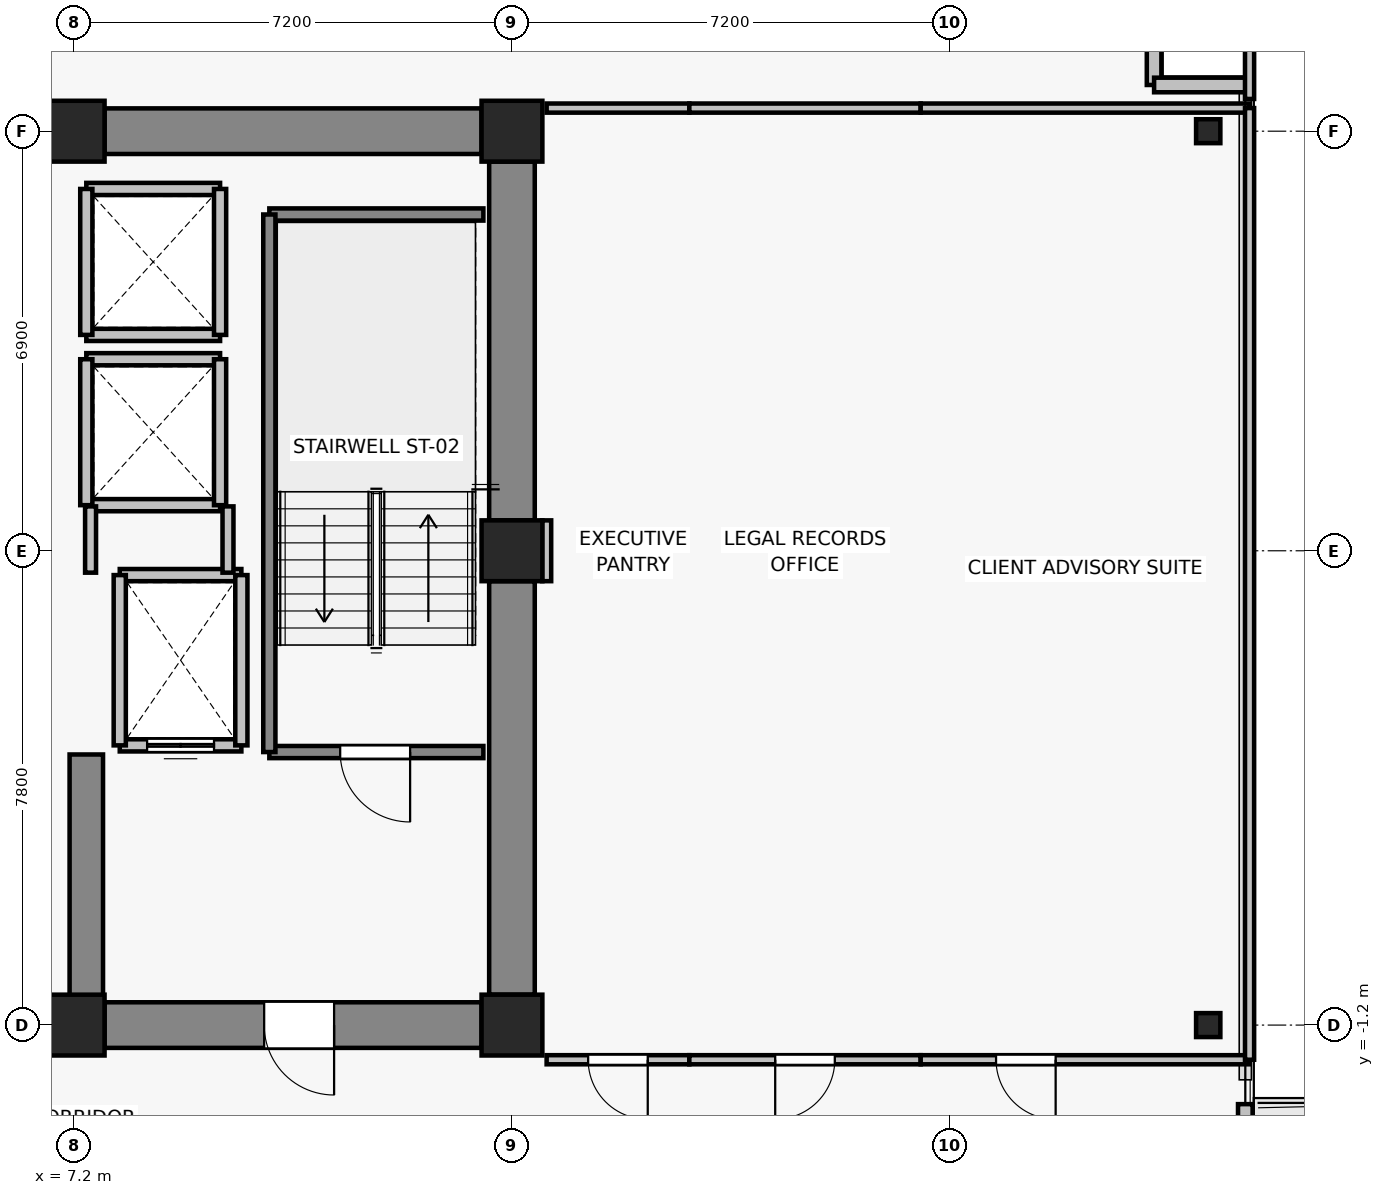
"""IFC4 building model, lengths in metres.
Left out: names, types, materials, properties, quantities, classifications, styles, units other than length and angle.
Written with IfcOpenShell. Run it as: python <this file> out.ifc"""

import sys

from ifc_helpers import new_model, si_unit, direction, frame, frame_2d, origin, origin_2d, place, context, subcontext, project, spatial, rectangle, i_section, extrude, source, transform, mapped, element, fill, save


model = new_model("IFC4")
c1 = context("Model", 3, precision=1e-05, world=origin(), true_north=direction((0.0, 1.0)))
c2 = subcontext(c1, "Body", "Model", "MODEL_VIEW")
j1 = project(units=[si_unit("LENGTHUNIT", "METRE"), si_unit("PLANEANGLEUNIT", "RADIAN")], contexts=[c1])
p1 = place(None, origin())
s1 = spatial("IfcSite", under=j1, at=p1, CompositionType="ELEMENT")
p2 = place(p1, origin())
s2 = spatial("IfcBuilding", under=s1, at=p2, CompositionType="ELEMENT")
p3 = place(p2, frame((0.0, 0.0, 195.7)))
s3 = spatial("IfcBuildingStorey", under=s2, at=p3, CompositionType="ELEMENT", Elevation=195.7)
for number, where, z_axis, x_axis in (
    (1, (7.2, -1.2, 0.0), (0.0, 0.0, 1.0), (1.0, 0.0, 0.0)),
    (2, (14.4, -1.2, 0.0), (0.0, 0.0, 1.0), (1.0, 0.0, 0.0)),
    (3, (14.4, 6.6, 0.0), (0.0, 0.0, 1.0), (1.0, 0.0, 0.0)),
    (4, (7.2, 13.5, 0.0), (0.0, 0.0, 1.0), (1.0, 0.0, 0.0)),
    (5, (14.4, 13.5, 0.0), (0.0, 0.0, 1.0), (1.0, 0.0, 0.0)),
):
    element("IfcColumn", number, at=place(p3, frame(where, z_axis=z_axis, x_axis=x_axis)), inside=s3, PredefinedType="COLUMN", context=c2, shape_type="SweptSolid", body=[
        extrude(rectangle(XDim=1.0, YDim=1.0, at=origin_2d()), origin(), (0.0, 0.0, 1.0), 3.3),
    ])
for number, where, z_axis, x_axis in (
    (6, (25.85, -1.2, 0.0), (0.0, 0.0, 1.0), (1.0, 0.0, 0.0)),
    (7, (25.85, 13.5, 0.0), (0.0, 0.0, 1.0), (1.0, 0.0, 0.0)),
):
    element("IfcColumn", number, at=place(p3, frame(where, z_axis=z_axis, x_axis=x_axis)), inside=s3, PredefinedType="COLUMN", context=c2, shape_type="SweptSolid", body=[
        extrude(i_section(OverallWidth=0.399, OverallDepth=0.394, WebThickness=0.023, FlangeThickness=0.037, FilletRadius=0.015, at=origin_2d()), origin(), (0.0, 0.0, 1.0), 3.3),
    ])
p4 = place(p3, frame((7.7, 13.5, 0.0), z_axis=(0.0, 0.0, 1.0), x_axis=(1.0, 0.0, 0.0)))
e8 = element("IfcWall", 8, at=p4, inside=s3, PredefinedType="SHEAR", context=c2, shape_type="SweptSolid", body=[
    extrude(rectangle(XDim=6.2, YDim=0.75, at=frame_2d((3.1, 0.0))), origin(), (0.0, 0.0, 1.0), 3.05),
])
p5 = place(p3, frame((14.4, -0.7, 0.0), z_axis=(0.0, 0.0, 1.0), x_axis=(0.0, 1.0, 0.0)))
e9 = element("IfcWall", 9, at=p5, inside=s3, PredefinedType="SHEAR", context=c2, shape_type="SweptSolid", body=[
    extrude(rectangle(XDim=6.8, YDim=0.75, at=frame_2d((3.4, 0.0))), origin(), (0.0, 0.0, 1.0), 3.05),
])
p6 = place(p3, frame((14.4, 7.1, 0.0), z_axis=(0.0, 0.0, 1.0), x_axis=(0.0, 1.0, 0.0)))
e10 = element("IfcWall", 10, at=p6, inside=s3, PredefinedType="SHEAR", context=c2, shape_type="SweptSolid", body=[
    extrude(rectangle(XDim=5.9, YDim=0.75, at=frame_2d((2.95, 0.0))), origin(), (0.0, 0.0, 1.0), 3.05),
])
p7 = place(p3, frame((13.9, -1.2, 0.0), z_axis=(0.0, 0.0, 1.0), x_axis=(-1.0, 0.0, 0.0)))
e11 = element("IfcWall", 11, at=p7, inside=s3, PredefinedType="SHEAR", context=c2, shape_type="SweptSolid", body=[
    extrude(rectangle(XDim=6.2, YDim=0.75, at=frame_2d((3.1, 0.0))), origin(), (0.0, 0.0, 1.0), 3.05),
])
p8 = place(p7, frame((2.425, 0.0, 0.0)))
e12 = element("IfcOpeningElement", 12, at=p8, cuts=e11, PredefinedType="OPENING", context=c2, shape_type="SweptSolid", body=[
    extrude(rectangle(XDim=1.15, YDim=2.15, at=frame_2d((0.575, 1.075))), frame((0.0, 0.385, 0.0), z_axis=(0.0, -1.0, 0.0), x_axis=(1.0, 0.0, 0.0)), (0.0, 0.0, 1.0), 0.77),
])
p9 = place(p3, frame((7.4, -0.825, 0.0), z_axis=(0.0, 0.0, 1.0), x_axis=(0.0, 1.0, 0.0)))
e13 = element("IfcWall", 13, at=p9, inside=s3, PredefinedType="SHEAR", context=c2, shape_type="SweptSolid", body=[
    extrude(rectangle(XDim=4.075, YDim=0.55, at=frame_2d((2.038, 0.0))), origin(), (0.0, 0.0, 1.0), 3.05),
])
p10 = place(p3, frame((26.46, -2.5, 0.0), z_axis=(0.0, 0.0, 1.0), x_axis=(0.0, -1.0, 0.0)))
e14 = element("IfcWall", 14, at=p10, inside=s3, PredefinedType="SOLIDWALL", context=c2, shape_type="SweptSolid", body=[
    extrude(rectangle(XDim=5.8, YDim=0.24, at=frame_2d((2.9, 0.0))), origin(), (0.0, 0.0, 1.0), 3.05),
])
p11 = place(p10, frame((1.566, 0.0, 0.0)))
e15 = element("IfcOpeningElement", 15, at=p11, cuts=e14, PredefinedType="OPENING", context=c2, shape_type="SweptSolid", body=[
    extrude(rectangle(XDim=1.0, YDim=2.2, at=frame_2d((0.5, 1.1))), frame((0.0, 0.13, 0.0), z_axis=(0.0, -1.0, 0.0), x_axis=(1.0, 0.0, 0.0)), (0.0, 0.0, 1.0), 0.26),
])
p12 = place(p10, frame((2.916, 0.0, 0.85)))
e16 = element("IfcOpeningElement", 16, at=p12, cuts=e14, PredefinedType="OPENING", context=c2, shape_type="SweptSolid", body=[
    extrude(rectangle(XDim=1.2, YDim=1.5, at=frame_2d((0.6, 0.75))), frame((0.0, 0.13, 0.0), z_axis=(0.0, -1.0, 0.0), x_axis=(1.0, 0.0, 0.0)), (0.0, 0.0, 1.0), 0.26),
])
for number, where, z_axis, x_axis in (
    (17, (24.96, 14.26, 0.0), (0.0, 0.0, 1.0), (0.0, 1.0, 0.0)),
    (18, (26.46, 14.26, 0.0), (0.0, 0.0, 1.0), (-1.0, 0.0, 0.0)),
):
    element("IfcWall", number, at=place(p3, frame(where, z_axis=z_axis, x_axis=x_axis)), inside=s3, PredefinedType="SOLIDWALL", context=c2, shape_type="SweptSolid", body=[
        extrude(rectangle(XDim=1.5, YDim=0.24, at=frame_2d((0.75, 0.0))), origin(), (0.0, 0.0, 1.0), 3.05),
    ])
p13 = place(p3, frame((9.95, 3.4, 0.0), z_axis=(0.0, 0.0, 1.0), x_axis=(-1.0, 0.0, 0.0)))
e19 = element("IfcWall", 19, at=p13, inside=s3, PredefinedType="SOLIDWALL", context=c2, shape_type="SweptSolid", body=[
    extrude(rectangle(XDim=2.0, YDim=0.2, at=frame_2d((1.0, 0.0))), origin(), (0.0, 0.0, 1.0), 3.05),
])
p14 = place(p13, frame((0.45, 0.0, 0.0)))
e20 = element("IfcOpeningElement", 20, at=p14, cuts=e19, PredefinedType="OPENING", context=c2, shape_type="SweptSolid", body=[
    extrude(rectangle(XDim=1.1, YDim=2.2, at=frame_2d((0.55, 1.1))), frame((0.0, 0.11, 0.0), z_axis=(0.0, -1.0, 0.0), x_axis=(1.0, 0.0, 0.0)), (0.0, 0.0, 1.0), 0.22),
])
p15 = place(p3, frame((7.95, 6.2, 0.0), z_axis=(0.0, 0.0, 1.0), x_axis=(1.0, 0.0, 0.0)))
e21 = element("IfcWall", 21, at=p15, inside=s3, PredefinedType="SOLIDWALL", context=c2, shape_type="SweptSolid", body=[
    extrude(rectangle(XDim=2.0, YDim=0.2, at=frame_2d((1.0, 0.0))), origin(), (0.0, 0.0, 1.0), 3.05),
])
for number, where, z_axis, x_axis in (
    (22, (7.95, 3.4, 0.0), (0.0, 0.0, 1.0), (0.0, 1.0, 0.0)),
    (23, (9.95, 6.2, 0.0), (0.0, 0.0, 1.0), (0.0, -1.0, 0.0)),
):
    element("IfcWall", number, at=place(p3, frame(where, z_axis=z_axis, x_axis=x_axis)), inside=s3, PredefinedType="SOLIDWALL", context=c2, shape_type="SweptSolid", body=[
        extrude(rectangle(XDim=2.8, YDim=0.2, at=frame_2d((1.4, 0.0))), origin(), (0.0, 0.0, 1.0), 3.05),
    ])
for number, where, z_axis, x_axis in (
    (24, (9.6, 7.35, 0.0), (0.0, 0.0, 1.0), (-1.0, 0.0, 0.0)),
    (25, (7.4, 9.75, 0.0), (0.0, 0.0, 1.0), (1.0, 0.0, 0.0)),
):
    element("IfcWall", number, at=place(p3, frame(where, z_axis=z_axis, x_axis=x_axis)), inside=s3, PredefinedType="SOLIDWALL", context=c2, shape_type="SweptSolid", body=[
        extrude(rectangle(XDim=2.2, YDim=0.2, at=frame_2d((1.1, 0.0))), origin(), (0.0, 0.0, 1.0), 2.54),
    ])
p16 = place(p3, frame((7.4, 7.35, 0.0), z_axis=(0.0, 0.0, 1.0), x_axis=(0.0, 1.0, 0.0)))
e26 = element("IfcWall", 26, at=p16, inside=s3, PredefinedType="SOLIDWALL", context=c2, shape_type="SweptSolid", body=[
    extrude(rectangle(XDim=2.4, YDim=0.2, at=frame_2d((1.2, 0.0))), origin(), (0.0, 0.0, 1.0), 2.54),
])
p17 = place(p3, frame((9.6, 9.75, 0.0), z_axis=(0.0, 0.0, 1.0), x_axis=(0.0, -1.0, 0.0)))
e27 = element("IfcWall", 27, at=p17, inside=s3, PredefinedType="SOLIDWALL", context=c2, shape_type="SweptSolid", body=[
    extrude(rectangle(XDim=2.4, YDim=0.2, at=frame_2d((1.2, 0.0))), origin(), (0.0, 0.0, 1.0), 3.05),
])
for number, where, z_axis, x_axis in (
    (28, (9.6, 10.15, 0.0), (0.0, 0.0, 1.0), (-1.0, 0.0, 0.0)),
    (29, (7.4, 12.55, 0.0), (0.0, 0.0, 1.0), (1.0, 0.0, 0.0)),
):
    element("IfcWall", number, at=place(p3, frame(where, z_axis=z_axis, x_axis=x_axis)), inside=s3, PredefinedType="SOLIDWALL", context=c2, shape_type="SweptSolid", body=[
        extrude(rectangle(XDim=2.2, YDim=0.2, at=frame_2d((1.1, 0.0))), origin(), (0.0, 0.0, 1.0), 2.54),
    ])
p18 = place(p3, frame((7.4, 10.15, 0.0), z_axis=(0.0, 0.0, 1.0), x_axis=(0.0, 1.0, 0.0)))
e30 = element("IfcWall", 30, at=p18, inside=s3, PredefinedType="SOLIDWALL", context=c2, shape_type="SweptSolid", body=[
    extrude(rectangle(XDim=2.4, YDim=0.2, at=frame_2d((1.2, 0.0))), origin(), (0.0, 0.0, 1.0), 2.54),
])
p19 = place(p3, frame((9.6, 12.55, 0.0), z_axis=(0.0, 0.0, 1.0), x_axis=(0.0, -1.0, 0.0)))
e31 = element("IfcWall", 31, at=p19, inside=s3, PredefinedType="SOLIDWALL", context=c2, shape_type="SweptSolid", body=[
    extrude(rectangle(XDim=2.4, YDim=0.2, at=frame_2d((1.2, 0.0))), origin(), (0.0, 0.0, 1.0), 3.05),
])
p20 = place(p3, frame((13.93, 3.29, 0.0), z_axis=(0.0, 0.0, 1.0), x_axis=(-1.0, 0.0, 0.0)))
e32 = element("IfcWall", 32, at=p20, inside=s3, PredefinedType="SOLIDWALL", context=c2, shape_type="SweptSolid", body=[
    extrude(rectangle(XDim=3.52, YDim=0.2, at=frame_2d((1.76, 0.0))), origin(), (0.0, 0.0, 1.0), 3.05),
])
p21 = place(p20, frame((1.205, 0.0, 0.0)))
e33 = element("IfcOpeningElement", 33, at=p21, cuts=e32, PredefinedType="OPENING", context=c2, shape_type="SweptSolid", body=[
    extrude(rectangle(XDim=1.15, YDim=2.15, at=frame_2d((0.575, 1.075))), frame((0.0, 0.11, 0.0), z_axis=(0.0, -1.0, 0.0), x_axis=(1.0, 0.0, 0.0)), (0.0, 0.0, 1.0), 0.22),
])
p22 = place(p3, frame((10.41, 12.13, 0.0), z_axis=(0.0, 0.0, 1.0), x_axis=(1.0, 0.0, 0.0)))
e34 = element("IfcWall", 34, at=p22, inside=s3, PredefinedType="SOLIDWALL", context=c2, shape_type="SweptSolid", body=[
    extrude(rectangle(XDim=3.52, YDim=0.2, at=frame_2d((1.76, 0.0))), origin(), (0.0, 0.0, 1.0), 3.05),
])
p23 = place(p3, frame((10.41, 3.29, 0.0), z_axis=(0.0, 0.0, 1.0), x_axis=(0.0, 1.0, 0.0)))
e35 = element("IfcWall", 35, at=p23, inside=s3, PredefinedType="SOLIDWALL", context=c2, shape_type="SweptSolid", body=[
    extrude(rectangle(XDim=8.84, YDim=0.2, at=frame_2d((4.42, 0.0))), origin(), (0.0, 0.0, 1.0), 3.05),
])
p24 = place(p3, frame((7.47, 6.24, 0.0), z_axis=(0.0, 0.0, 1.0), x_axis=(0.0, 1.0, 0.0)))
e36 = element("IfcWall", 36, at=p24, inside=s3, PredefinedType="PARTITIONING", context=c2, shape_type="SweptSolid", body=[
    extrude(rectangle(XDim=1.09, YDim=0.18, at=frame_2d((0.545, 0.0))), origin(), (0.0, 0.0, 1.0), 2.54),
])
p25 = place(p3, frame((9.73, 7.33, 0.0), z_axis=(0.0, 0.0, 1.0), x_axis=(0.0, -1.0, 0.0)))
e37 = element("IfcWall", 37, at=p25, inside=s3, PredefinedType="PARTITIONING", context=c2, shape_type="SweptSolid", body=[
    extrude(rectangle(XDim=1.09, YDim=0.18, at=frame_2d((0.545, 0.0))), origin(), (0.0, 0.0, 1.0), 3.05),
])
p26 = place(p3, frame((17.317, -1.77, 0.0), z_axis=(0.0, 0.0, 1.0), x_axis=(-1.0, 0.0, 0.0)))
e38 = element("IfcWall", 38, at=p26, inside=s3, PredefinedType="PARTITIONING", context=c2, shape_type="SweptSolid", body=[
    extrude(rectangle(XDim=2.347, YDim=0.15, at=frame_2d((1.173, 0.0))), origin(), (0.0, 0.0, 1.0), 3.05),
])
p27 = place(p26, frame((0.684, 0.0, 0.0)))
e39 = element("IfcOpeningElement", 39, at=p27, cuts=e38, PredefinedType="OPENING", context=c2, shape_type="SweptSolid", body=[
    extrude(rectangle(XDim=0.98, YDim=2.15, at=frame_2d((0.49, 1.075))), frame((0.0, 0.085, 0.0), z_axis=(0.0, -1.0, 0.0), x_axis=(1.0, 0.0, 0.0)), (0.0, 0.0, 1.0), 0.17),
])
p28 = place(p3, frame((14.97, 13.88, 0.0), z_axis=(0.0, 0.0, 1.0), x_axis=(1.0, 0.0, 0.0)))
e40 = element("IfcWall", 40, at=p28, inside=s3, PredefinedType="PARTITIONING", context=c2, shape_type="SweptSolid", body=[
    extrude(rectangle(XDim=2.347, YDim=0.15, at=frame_2d((1.173, 0.0))), origin(), (0.0, 0.0, 1.0), 3.05),
])
p29 = place(p3, frame((14.97, 6.1, 0.0), z_axis=(0.0, 0.0, 1.0), x_axis=(0.0, 1.0, 0.0)))
e41 = element("IfcWall", 41, at=p29, inside=s3, PredefinedType="PARTITIONING", context=c2, shape_type="SweptSolid", body=[
    extrude(rectangle(XDim=1.0, YDim=0.15, at=frame_2d((0.5, 0.0))), origin(), (0.0, 0.0, 1.0), 3.05),
])
p30 = place(p3, frame((21.122, -1.77, 0.0), z_axis=(0.0, 0.0, 1.0), x_axis=(-1.0, 0.0, 0.0)))
e42 = element("IfcWall", 42, at=p30, inside=s3, PredefinedType="PARTITIONING", context=c2, shape_type="SweptSolid", body=[
    extrude(rectangle(XDim=3.805, YDim=0.15, at=frame_2d((1.902, 0.0))), origin(), (0.0, 0.0, 1.0), 3.05),
])
p31 = place(p30, frame((1.413, 0.0, 0.0)))
e43 = element("IfcOpeningElement", 43, at=p31, cuts=e42, PredefinedType="OPENING", context=c2, shape_type="SweptSolid", body=[
    extrude(rectangle(XDim=0.98, YDim=2.15, at=frame_2d((0.49, 1.075))), frame((0.0, 0.085, 0.0), z_axis=(0.0, -1.0, 0.0), x_axis=(1.0, 0.0, 0.0)), (0.0, 0.0, 1.0), 0.17),
])
p32 = place(p3, frame((17.317, 13.88, 0.0), z_axis=(0.0, 0.0, 1.0), x_axis=(1.0, 0.0, 0.0)))
e44 = element("IfcWall", 44, at=p32, inside=s3, PredefinedType="PARTITIONING", context=c2, shape_type="SweptSolid", body=[
    extrude(rectangle(XDim=3.805, YDim=0.15, at=frame_2d((1.902, 0.0))), origin(), (0.0, 0.0, 1.0), 3.05),
])
p33 = place(p3, frame((26.53, -1.77, 0.0), z_axis=(0.0, 0.0, 1.0), x_axis=(-1.0, 0.0, 0.0)))
e45 = element("IfcWall", 45, at=p33, inside=s3, PredefinedType="PARTITIONING", context=c2, shape_type="SweptSolid", body=[
    extrude(rectangle(XDim=5.408, YDim=0.15, at=frame_2d((2.704, 0.0))), origin(), (0.0, 0.0, 1.0), 2.54),
])
p34 = place(p33, frame((3.189, 0.0, 0.0)))
e46 = element("IfcOpeningElement", 46, at=p34, cuts=e45, PredefinedType="OPENING", context=c2, shape_type="SweptSolid", body=[
    extrude(rectangle(XDim=0.98, YDim=2.15, at=frame_2d((0.49, 1.075))), frame((0.0, 0.085, 0.0), z_axis=(0.0, -1.0, 0.0), x_axis=(1.0, 0.0, 0.0)), (0.0, 0.0, 1.0), 0.17),
])
p35 = place(p3, frame((21.122, 13.88, 0.0), z_axis=(0.0, 0.0, 1.0), x_axis=(1.0, 0.0, 0.0)))
e47 = element("IfcWall", 47, at=p35, inside=s3, PredefinedType="PARTITIONING", context=c2, shape_type="SweptSolid", body=[
    extrude(rectangle(XDim=5.408, YDim=0.15, at=frame_2d((2.704, 0.0))), origin(), (0.0, 0.0, 1.0), 3.05),
])
p36 = place(p3, frame((26.53, 13.88, 0.0), z_axis=(0.0, 0.0, 1.0), x_axis=(0.0, -1.0, 0.0)))
e48 = element("IfcWall", 48, at=p36, inside=s3, PredefinedType="PARTITIONING", context=c2, shape_type="SweptSolid", body=[
    extrude(rectangle(XDim=15.65, YDim=0.15, at=frame_2d((7.825, 0.0))), origin(), (0.0, 0.0, 1.0), 3.05),
])
p37 = place(p3, frame((26.53, 17.33, 0.0), z_axis=(0.0, 0.0, 1.0), x_axis=(0.0, -1.0, 0.0)))
e49 = element("IfcWall", 49, at=p37, inside=s3, PredefinedType="PARTITIONING", context=c2, shape_type="SweptSolid", body=[
    extrude(rectangle(XDim=3.3, YDim=0.15, at=frame_2d((1.65, 0.0))), origin(), (0.0, 0.0, 1.0), 3.05),
])
m1 = source(origin(), c2, "Body", "SweptSolid", [
    extrude(rectangle(XDim=1.1, YDim=2.2, at=frame_2d((0.55, 1.1))), frame((0.0, 0.025, 0.0), z_axis=(0.0, -1.0, 0.0), x_axis=(1.0, 0.0, 0.0)), (0.0, 0.0, 1.0), 0.05),
])
p38 = place(p14, origin())
e50 = element("IfcDoor", 50, at=p38, inside=s3, OperationType="DOUBLE_DOOR_SLIDING", PredefinedType="DOOR", context=c2, shape_type="MappedRepresentation", body=[
    mapped(m1, transform((0.0, 0.0, 0.0), x_axis=(1.0, 0.0, 0.0), y_axis=(0.0, 1.0, 0.0), z_axis=(0.0, 0.0, 1.0), scale=1.0)),
])
fill(e20, e50)
m2 = source(origin(), c2, "Body", "SweptSolid", [
    extrude(rectangle(XDim=1.15, YDim=2.15, at=frame_2d((0.575, 1.075))), frame((0.0, 0.025, 0.0), z_axis=(0.0, -1.0, 0.0), x_axis=(1.0, 0.0, 0.0)), (0.0, 0.0, 1.0), 0.05),
])
p39 = place(p21, origin())
e51 = element("IfcDoor", 51, at=p39, inside=s3, OperationType="SINGLE_SWING_LEFT", PredefinedType="DOOR", context=c2, shape_type="MappedRepresentation", body=[
    mapped(m2, transform((0.0, 0.0, 0.0), x_axis=(1.0, 0.0, 0.0), y_axis=(0.0, 1.0, 0.0), z_axis=(0.0, 0.0, 1.0), scale=1.0)),
])
fill(e33, e51)
p40 = place(p8, origin())
e52 = element("IfcDoor", 52, at=p40, inside=s3, OperationType="SINGLE_SWING_LEFT", PredefinedType="DOOR", context=c2, shape_type="MappedRepresentation", body=[
    mapped(m2, transform((0.0, 0.0, 0.0), x_axis=(1.0, 0.0, 0.0), y_axis=(0.0, 1.0, 0.0), z_axis=(0.0, 0.0, 1.0), scale=1.0)),
])
fill(e12, e52)
m3 = source(origin(), c2, "Body", "SweptSolid", [
    extrude(rectangle(XDim=0.98, YDim=2.15, at=frame_2d((0.49, 1.075))), frame((0.0, 0.025, 0.0), z_axis=(0.0, -1.0, 0.0), x_axis=(1.0, 0.0, 0.0)), (0.0, 0.0, 1.0), 0.05),
])
p41 = place(p27, origin())
e53 = element("IfcDoor", 53, at=p41, inside=s3, OperationType="SINGLE_SWING_LEFT", PredefinedType="DOOR", context=c2, shape_type="MappedRepresentation", body=[
    mapped(m3, transform((0.0, 0.0, 0.0), x_axis=(1.0, 0.0, 0.0), y_axis=(0.0, 1.0, 0.0), z_axis=(0.0, 0.0, 1.0), scale=1.0)),
])
fill(e39, e53)
p42 = place(p31, origin())
e54 = element("IfcDoor", 54, at=p42, inside=s3, OperationType="SINGLE_SWING_RIGHT", PredefinedType="DOOR", context=c2, shape_type="MappedRepresentation", body=[
    mapped(m3, transform((0.0, 0.0, 0.0), x_axis=(1.0, 0.0, 0.0), y_axis=(0.0, 1.0, 0.0), z_axis=(0.0, 0.0, 1.0), scale=1.0)),
])
fill(e43, e54)
p43 = place(p34, origin())
e55 = element("IfcDoor", 55, at=p43, inside=s3, OperationType="SINGLE_SWING_LEFT", PredefinedType="DOOR", context=c2, shape_type="MappedRepresentation", body=[
    mapped(m3, transform((0.0, 0.0, 0.0), x_axis=(1.0, 0.0, 0.0), y_axis=(0.0, 1.0, 0.0), z_axis=(0.0, 0.0, 1.0), scale=1.0)),
])
fill(e46, e55)
save(model, sys.argv[1])
